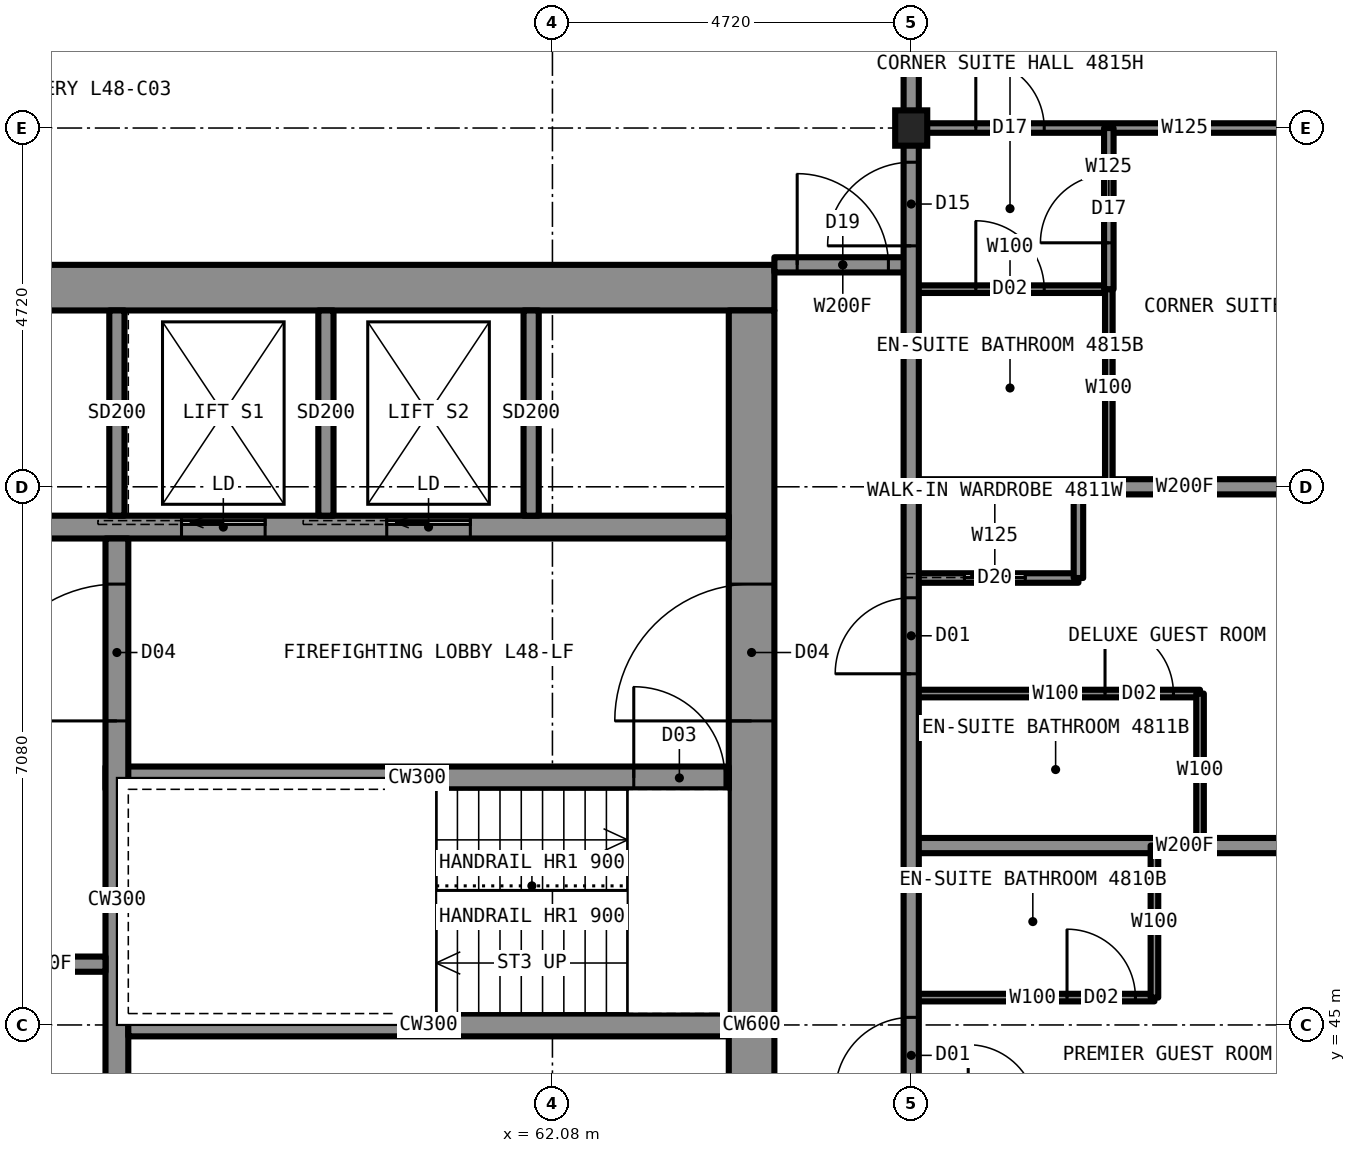
"""IFC4 building model, lengths in metres.
Left out: names, types, materials, properties, quantities, classifications, styles, units other than length and angle.
Written with IfcOpenShell. Run it as: python <this file> out.ifc"""

import sys

from ifc_helpers import new_model, si_unit, direction, frame, frame_2d, origin, origin_2d, place, context, subcontext, project, spatial, rectangle, i_section, extrude, element, fill, save


model = new_model("IFC4")
c1 = context("Model", 3, precision=1e-05, world=origin(), true_north=direction((0.0, 1.0)))
c2 = subcontext(c1, "Body", "Model", "MODEL_VIEW")
j1 = project(units=[si_unit("LENGTHUNIT", "METRE"), si_unit("PLANEANGLEUNIT", "RADIAN")], contexts=[c1])
p1 = place(None, origin())
s1 = spatial("IfcSite", under=j1, at=p1, CompositionType="ELEMENT")
p2 = place(p1, origin())
s2 = spatial("IfcBuilding", under=s1, at=p2, CompositionType="ELEMENT")
p3 = place(p2, frame((0.0, 0.0, 172.3)))
s3 = spatial("IfcBuildingStorey", under=s2, at=p3, CompositionType="ELEMENT", Elevation=172.3)
p4 = place(p3, frame((66.8, 56.8, 0.0), z_axis=(0.0, 0.0, 1.0), x_axis=(1.0, 0.0, 0.0)))
e1 = element("IfcColumn", 1, at=p4, inside=s3, PredefinedType="COLUMN", context=c2, shape_type="SweptSolid", body=[
    extrude(i_section(OverallWidth=0.422, OverallDepth=0.465, WebThickness=0.045, FlangeThickness=0.073, at=origin_2d()), origin(), (0.0, 0.0, 1.0), 3.5),
])
p5 = place(p3, frame((45.0, 54.7, 0.0), z_axis=(0.0, 0.0, 1.0), x_axis=(1.0, 0.0, 0.0)))
e2 = element("IfcWall", 2, at=p5, inside=s3, PredefinedType="SHEAR", context=c2, shape_type="SweptSolid", body=[
    extrude(rectangle(XDim=20.0, YDim=0.6, at=frame_2d((10.0, 0.0))), origin(), (0.0, 0.0, 1.0), 3.5),
])
p6 = place(p3, frame((64.7, 35.6, 0.0), z_axis=(0.0, 0.0, 1.0), x_axis=(0.0, 1.0, 0.0)))
e3 = element("IfcWall", 3, at=p6, inside=s3, PredefinedType="SHEAR", context=c2, shape_type="SweptSolid", body=[
    extrude(rectangle(XDim=18.8, YDim=0.6, at=frame_2d((9.4, 0.0))), origin(), (0.0, 0.0, 1.0), 3.5),
])
p7 = place(p6, frame((13.4, 0.0, 0.0)))
e4 = element("IfcOpeningElement", 4, at=p7, cuts=e3, PredefinedType="OPENING", context=c2, shape_type="SweptSolid", body=[
    extrude(rectangle(XDim=1.8, YDim=2.2, at=frame_2d((0.9, 1.1))), frame((0.0, 0.31, 0.0), z_axis=(0.0, -1.0, 0.0), x_axis=(1.0, 0.0, 0.0)), (0.0, 0.0, 1.0), 0.62),
])
p8 = place(p6, frame((3.6, 0.0, 0.0)))
e5 = element("IfcOpeningElement", 5, at=p8, cuts=e3, PredefinedType="OPENING", context=c2, shape_type="SweptSolid", body=[
    extrude(rectangle(XDim=1.8, YDim=2.2, at=frame_2d((0.9, 1.1))), frame((0.0, 0.31, 0.0), z_axis=(0.0, -1.0, 0.0), x_axis=(1.0, 0.0, 0.0)), (0.0, 0.0, 1.0), 0.62),
])
p9 = place(p3, frame((45.6, 51.55, 0.0), z_axis=(0.0, 0.0, 1.0), x_axis=(1.0, 0.0, 0.0)))
e6 = element("IfcWall", 6, at=p9, inside=s3, PredefinedType="SHEAR", context=c2, shape_type="SweptSolid", body=[
    extrude(rectangle(XDim=18.8, YDim=0.3, at=frame_2d((9.4, 0.0))), origin(), (0.0, 0.0, 1.0), 3.5),
])
p10 = place(p9, frame((4.8, 0.0, 0.0)))
e7 = element("IfcOpeningElement", 7, at=p10, cuts=e6, PredefinedType="OPENING", context=c2, shape_type="SweptSolid", body=[
    extrude(rectangle(XDim=1.0, YDim=2.1, at=frame_2d((0.5, 1.05))), frame((0.0, 0.16, 0.0), z_axis=(0.0, -1.0, 0.0), x_axis=(1.0, 0.0, 0.0)), (0.0, 0.0, 1.0), 0.32),
])
p11 = place(p9, frame((11.6, 0.0, 0.0)))
e8 = element("IfcOpeningElement", 8, at=p11, cuts=e6, PredefinedType="OPENING", context=c2, shape_type="SweptSolid", body=[
    extrude(rectangle(XDim=1.1, YDim=2.2, at=frame_2d((0.55, 1.1))), frame((0.0, 0.16, 0.0), z_axis=(0.0, -1.0, 0.0), x_axis=(1.0, 0.0, 0.0)), (0.0, 0.0, 1.0), 0.32),
])
p12 = place(p9, frame((14.3, 0.0, 0.0)))
e9 = element("IfcOpeningElement", 9, at=p12, cuts=e6, PredefinedType="OPENING", context=c2, shape_type="SweptSolid", body=[
    extrude(rectangle(XDim=1.1, YDim=2.2, at=frame_2d((0.55, 1.1))), frame((0.0, 0.16, 0.0), z_axis=(0.0, -1.0, 0.0), x_axis=(1.0, 0.0, 0.0)), (0.0, 0.0, 1.0), 0.32),
])
p13 = place(p3, frame((56.2, 48.25, 0.0), z_axis=(0.0, 0.0, 1.0), x_axis=(1.0, 0.0, 0.0)))
e10 = element("IfcWall", 10, at=p13, inside=s3, PredefinedType="SHEAR", context=c2, shape_type="SweptSolid", body=[
    extrude(rectangle(XDim=8.2, YDim=0.3, at=frame_2d((4.1, 0.0))), origin(), (0.0, 0.0, 1.0), 3.5),
])
p14 = place(p13, frame((6.95, 0.0, 0.0)))
e11 = element("IfcOpeningElement", 11, at=p14, cuts=e10, PredefinedType="OPENING", context=c2, shape_type="SweptSolid", body=[
    extrude(rectangle(XDim=1.2, YDim=2.2, at=frame_2d((0.6, 1.1))), frame((0.0, 0.16, 0.0), z_axis=(0.0, -1.0, 0.0), x_axis=(1.0, 0.0, 0.0)), (0.0, 0.0, 1.0), 0.32),
])
p15 = place(p3, frame((56.35, 41.9, 0.0), z_axis=(0.0, 0.0, 1.0), x_axis=(0.0, 1.0, 0.0)))
e12 = element("IfcWall", 12, at=p15, inside=s3, PredefinedType="SHEAR", context=c2, shape_type="SweptSolid", body=[
    extrude(rectangle(XDim=9.5, YDim=0.3, at=frame_2d((4.75, 0.0))), origin(), (0.0, 0.0, 1.0), 3.5),
])
p16 = place(p15, frame((7.1, 0.0, 0.0)))
e13 = element("IfcOpeningElement", 13, at=p16, cuts=e12, PredefinedType="OPENING", context=c2, shape_type="SweptSolid", body=[
    extrude(rectangle(XDim=1.8, YDim=2.2, at=frame_2d((0.9, 1.1))), frame((0.0, 0.16, 0.0), z_axis=(0.0, -1.0, 0.0), x_axis=(1.0, 0.0, 0.0)), (0.0, 0.0, 1.0), 0.32),
])
p17 = place(p3, frame((56.5, 45.0, 0.0), z_axis=(0.0, 0.0, 1.0), x_axis=(1.0, 0.0, 0.0)))
e14 = element("IfcWall", 14, at=p17, inside=s3, PredefinedType="SHEAR", context=c2, shape_type="SweptSolid", body=[
    extrude(rectangle(XDim=7.9, YDim=0.3, at=frame_2d((3.95, 0.0))), origin(), (0.0, 0.0, 1.0), 3.5),
])
p18 = place(p3, frame((66.8, 45.36, 0.0), z_axis=(0.0, 0.0, 1.0), x_axis=(1.0, 0.0, 0.0)))
e15 = element("IfcWall", 15, at=p18, inside=s3, PredefinedType="PARTITIONING", context=c2, shape_type="SweptSolid", body=[
    extrude(rectangle(XDim=3.2, YDim=0.1, at=frame_2d((1.6, 0.0))), origin(), (0.0, 0.0, 1.0), 3.33),
])
p19 = place(p18, frame((2.05, 0.0, 0.0)))
e16 = element("IfcOpeningElement", 16, at=p19, cuts=e15, PredefinedType="OPENING", context=c2, shape_type="SweptSolid", body=[
    extrude(rectangle(XDim=0.9, YDim=2.1, at=frame_2d((0.45, 1.05))), frame((0.0, 0.06, 0.0), z_axis=(0.0, -1.0, 0.0), x_axis=(1.0, 0.0, 0.0)), (0.0, 0.0, 1.0), 0.12),
])
p20 = place(p3, frame((65.0, 55.0, 0.0), z_axis=(0.0, 0.0, 1.0), x_axis=(1.0, 0.0, 0.0)))
e17 = element("IfcWall", 17, at=p20, inside=s3, PredefinedType="PARTITIONING", context=c2, shape_type="SweptSolid", body=[
    extrude(rectangle(XDim=1.8, YDim=0.2, at=frame_2d((0.9, 0.0))), origin(), (0.0, 0.0, 1.0), 3.33),
])
p21 = place(p20, frame((0.3, 0.0, 0.0)))
e18 = element("IfcOpeningElement", 18, at=p21, cuts=e17, PredefinedType="OPENING", context=c2, shape_type="SweptSolid", body=[
    extrude(rectangle(XDim=1.2, YDim=2.2, at=frame_2d((0.6, 1.1))), frame((0.0, 0.11, 0.0), z_axis=(0.0, -1.0, 0.0), x_axis=(1.0, 0.0, 0.0)), (0.0, 0.0, 1.0), 0.22),
])
p22 = place(p3, frame((66.8, 56.8, 0.0), z_axis=(0.0, 0.0, 1.0), x_axis=(1.0, 0.0, 0.0)))
e19 = element("IfcWall", 19, at=p22, inside=s3, PredefinedType="PARTITIONING", context=c2, shape_type="SweptSolid", body=[
    extrude(rectangle(XDim=7.2, YDim=0.125, at=frame_2d((3.6, 0.0))), origin(), (0.0, 0.0, 1.0), 2.573),
])
p23 = place(p22, frame((0.85, 0.0, 0.0)))
e20 = element("IfcOpeningElement", 20, at=p23, cuts=e19, PredefinedType="OPENING", context=c2, shape_type="SweptSolid", body=[
    extrude(rectangle(XDim=0.9, YDim=2.2, at=frame_2d((0.45, 1.1))), frame((0.0, 0.073, 0.0), z_axis=(0.0, -1.0, 0.0), x_axis=(1.0, 0.0, 0.0)), (0.0, 0.0, 1.0), 0.145),
])
p24 = place(p3, frame((66.8, 47.36, 0.0), z_axis=(0.0, 0.0, 1.0), x_axis=(1.0, 0.0, 0.0)))
e21 = element("IfcWall", 21, at=p24, inside=s3, PredefinedType="PARTITIONING", context=c2, shape_type="SweptSolid", body=[
    extrude(rectangle(XDim=7.2, YDim=0.2, at=frame_2d((3.6, 0.0))), origin(), (0.0, 0.0, 1.0), 2.73),
])
p25 = place(p3, frame((66.8, 49.36, 0.0), z_axis=(0.0, 0.0, 1.0), x_axis=(1.0, 0.0, 0.0)))
e22 = element("IfcWall", 22, at=p25, inside=s3, PredefinedType="PARTITIONING", context=c2, shape_type="SweptSolid", body=[
    extrude(rectangle(XDim=3.8, YDim=0.1, at=frame_2d((1.9, 0.0))), origin(), (0.0, 0.0, 1.0), 3.33),
])
p26 = place(p25, frame((2.55, 0.0, 0.0)))
e23 = element("IfcOpeningElement", 23, at=p26, cuts=e22, PredefinedType="OPENING", context=c2, shape_type="SweptSolid", body=[
    extrude(rectangle(XDim=0.9, YDim=2.1, at=frame_2d((0.45, 1.05))), frame((0.0, 0.06, 0.0), z_axis=(0.0, -1.0, 0.0), x_axis=(1.0, 0.0, 0.0)), (0.0, 0.0, 1.0), 0.12),
])
p27 = place(p3, frame((66.8, 50.88, 0.0), z_axis=(0.0, 0.0, 1.0), x_axis=(1.0, 0.0, 0.0)))
e24 = element("IfcWall", 24, at=p27, inside=s3, PredefinedType="PARTITIONING", context=c2, shape_type="SweptSolid", body=[
    extrude(rectangle(XDim=2.2, YDim=0.125, at=frame_2d((1.1, 0.0))), origin(), (0.0, 0.0, 1.0), 3.33),
])
p28 = place(p27, frame((0.7, 0.0, 0.0)))
e25 = element("IfcOpeningElement", 25, at=p28, cuts=e24, PredefinedType="OPENING", context=c2, shape_type="SweptSolid", body=[
    extrude(rectangle(XDim=0.8, YDim=2.1, at=frame_2d((0.4, 1.05))), frame((0.0, 0.073, 0.0), z_axis=(0.0, -1.0, 0.0), x_axis=(1.0, 0.0, 0.0)), (0.0, 0.0, 1.0), 0.145),
])
p29 = place(p3, frame((66.8, 52.08, 0.0), z_axis=(0.0, 0.0, 1.0), x_axis=(1.0, 0.0, 0.0)))
e26 = element("IfcWall", 26, at=p29, inside=s3, PredefinedType="PARTITIONING", context=c2, shape_type="SweptSolid", body=[
    extrude(rectangle(XDim=7.2, YDim=0.2, at=frame_2d((3.6, 0.0))), origin(), (0.0, 0.0, 1.0), 2.573),
])
p30 = place(p3, frame((66.8, 54.68, 0.0), z_axis=(0.0, 0.0, 1.0), x_axis=(1.0, 0.0, 0.0)))
e27 = element("IfcWall", 27, at=p30, inside=s3, PredefinedType="PARTITIONING", context=c2, shape_type="SweptSolid", body=[
    extrude(rectangle(XDim=2.6, YDim=0.1, at=frame_2d((1.3, 0.0))), origin(), (0.0, 0.0, 1.0), 3.33),
])
p31 = place(p30, frame((0.85, 0.0, 0.0)))
e28 = element("IfcOpeningElement", 28, at=p31, cuts=e27, PredefinedType="OPENING", context=c2, shape_type="SweptSolid", body=[
    extrude(rectangle(XDim=0.9, YDim=2.1, at=frame_2d((0.45, 1.05))), frame((0.0, 0.06, 0.0), z_axis=(0.0, -1.0, 0.0), x_axis=(1.0, 0.0, 0.0)), (0.0, 0.0, 1.0), 0.12),
])
p32 = place(p3, frame((66.8, 33.2, 0.0), z_axis=(0.0, 0.0, 1.0), x_axis=(0.0, 1.0, 0.0)))
e29 = element("IfcWall", 29, at=p32, inside=s3, PredefinedType="PARTITIONING", context=c2, shape_type="SweptSolid", body=[
    extrude(rectangle(XDim=23.58, YDim=0.2, at=frame_2d((11.79, 0.0))), origin(), (0.0, 0.0, 1.0), 3.33),
])
p33 = place(p32, frame((7.87, 0.0, 0.0)))
e30 = element("IfcOpeningElement", 30, at=p33, cuts=e29, PredefinedType="OPENING", context=c2, shape_type="SweptSolid", body=[
    extrude(rectangle(XDim=1.0, YDim=2.2, at=frame_2d((0.5, 1.1))), frame((0.0, 0.11, 0.0), z_axis=(0.0, -1.0, 0.0), x_axis=(1.0, 0.0, 0.0)), (0.0, 0.0, 1.0), 0.22),
])
p34 = place(p32, frame((10.9, 0.0, 0.0)))
e31 = element("IfcOpeningElement", 31, at=p34, cuts=e29, PredefinedType="OPENING", context=c2, shape_type="SweptSolid", body=[
    extrude(rectangle(XDim=1.0, YDim=2.2, at=frame_2d((0.5, 1.1))), frame((0.0, 0.11, 0.0), z_axis=(0.0, -1.0, 0.0), x_axis=(1.0, 0.0, 0.0)), (0.0, 0.0, 1.0), 0.22),
])
p35 = place(p32, frame((16.42, 0.0, 0.0)))
e32 = element("IfcOpeningElement", 32, at=p35, cuts=e29, PredefinedType="OPENING", context=c2, shape_type="SweptSolid", body=[
    extrude(rectangle(XDim=1.0, YDim=2.2, at=frame_2d((0.5, 1.1))), frame((0.0, 0.11, 0.0), z_axis=(0.0, -1.0, 0.0), x_axis=(1.0, 0.0, 0.0)), (0.0, 0.0, 1.0), 0.22),
])
p36 = place(p32, frame((22.05, 0.0, 0.0)))
e33 = element("IfcOpeningElement", 33, at=p36, cuts=e29, PredefinedType="OPENING", context=c2, shape_type="SweptSolid", body=[
    extrude(rectangle(XDim=1.1, YDim=2.2, at=frame_2d((0.55, 1.1))), frame((0.0, 0.11, 0.0), z_axis=(0.0, -1.0, 0.0), x_axis=(1.0, 0.0, 0.0)), (0.0, 0.0, 1.0), 0.22),
])
p37 = place(p32, frame((0.65, 0.0, 0.0)))
e34 = element("IfcOpeningElement", 34, at=p37, cuts=e29, PredefinedType="OPENING", context=c2, shape_type="SweptSolid", body=[
    extrude(rectangle(XDim=1.1, YDim=2.2, at=frame_2d((0.55, 1.1))), frame((0.0, 0.11, 0.0), z_axis=(0.0, -1.0, 0.0), x_axis=(1.0, 0.0, 0.0)), (0.0, 0.0, 1.0), 0.22),
])
p38 = place(p3, frame((69.0, 50.88, 0.0), z_axis=(0.0, 0.0, 1.0), x_axis=(0.0, 1.0, 0.0)))
e35 = element("IfcWall", 35, at=p38, inside=s3, PredefinedType="PARTITIONING", context=c2, shape_type="SweptSolid", body=[
    extrude(rectangle(XDim=1.2, YDim=0.125, at=frame_2d((0.6, 0.0))), origin(), (0.0, 0.0, 1.0), 3.33),
])
p39 = place(p3, frame((69.4, 52.08, 0.0), z_axis=(0.0, 0.0, 1.0), x_axis=(0.0, 1.0, 0.0)))
e36 = element("IfcWall", 36, at=p39, inside=s3, PredefinedType="PARTITIONING", context=c2, shape_type="SweptSolid", body=[
    extrude(rectangle(XDim=2.6, YDim=0.1, at=frame_2d((1.3, 0.0))), origin(), (0.0, 0.0, 1.0), 3.33),
])
p40 = place(p3, frame((69.4, 54.68, 0.0), z_axis=(0.0, 0.0, 1.0), x_axis=(0.0, 1.0, 0.0)))
e37 = element("IfcWall", 37, at=p40, inside=s3, PredefinedType="PARTITIONING", context=c2, shape_type="SweptSolid", body=[
    extrude(rectangle(XDim=2.12, YDim=0.125, at=frame_2d((1.06, 0.0))), origin(), (0.0, 0.0, 1.0), 3.33),
])
p41 = place(p40, frame((0.61, 0.0, 0.0)))
e38 = element("IfcOpeningElement", 38, at=p41, cuts=e37, PredefinedType="OPENING", context=c2, shape_type="SweptSolid", body=[
    extrude(rectangle(XDim=0.9, YDim=2.2, at=frame_2d((0.45, 1.1))), frame((0.0, 0.073, 0.0), z_axis=(0.0, -1.0, 0.0), x_axis=(1.0, 0.0, 0.0)), (0.0, 0.0, 1.0), 0.145),
])
for number, where, z_axis, x_axis in (
    (39, (70.0, 45.36, 0.0), (0.0, 0.0, 1.0), (0.0, 1.0, 0.0)),
    (40, (70.6, 47.36, 0.0), (0.0, 0.0, 1.0), (0.0, 1.0, 0.0)),
):
    element("IfcWall", number, at=place(p3, frame(where, z_axis=z_axis, x_axis=x_axis)), inside=s3, PredefinedType="PARTITIONING", context=c2, shape_type="SweptSolid", body=[
        extrude(rectangle(XDim=2.0, YDim=0.1, at=frame_2d((1.0, 0.0))), origin(), (0.0, 0.0, 1.0), 3.33),
    ])
for number, where, z_axis, x_axis in (
    (41, (59.1, 51.7, 0.0), (0.0, 0.0, 1.0), (0.0, 1.0, 0.0)),
    (42, (61.8, 51.7, 0.0), (0.0, 0.0, 1.0), (0.0, 1.0, 0.0)),
    (43, (56.35, 51.7, 0.0), (0.0, 0.0, 1.0), (0.0, 1.0, 0.0)),
):
    element("IfcWall", number, at=place(p3, frame(where, z_axis=z_axis, x_axis=x_axis)), inside=s3, PredefinedType="PARTITIONING", context=c2, shape_type="SweptSolid", body=[
        extrude(rectangle(XDim=2.7, YDim=0.2, at=frame_2d((1.35, 0.0))), origin(), (0.0, 0.0, 1.0), 3.33),
    ])
p42 = place(p3, frame((66.8, 56.78, 0.0), z_axis=(0.0, 0.0, 1.0), x_axis=(0.0, 1.0, 0.0)))
e44 = element("IfcWall", 44, at=p42, inside=s3, PredefinedType="PARTITIONING", context=c2, shape_type="SweptSolid", body=[
    extrude(rectangle(XDim=2.82, YDim=0.2, at=frame_2d((1.41, 0.0))), origin(), (0.0, 0.0, 1.0), 2.573),
])
p43 = place(p21, origin())
e45 = element("IfcDoor", 45, at=p43, inside=s3, OperationType="SINGLE_SWING_LEFT", PredefinedType="DOOR", context=c2, shape_type="SweptSolid", body=[
    extrude(rectangle(XDim=1.2, YDim=2.2, at=frame_2d((0.6, 1.1))), frame((0.0, 0.025, 0.0), z_axis=(0.0, -1.0, 0.0), x_axis=(1.0, 0.0, 0.0)), (0.0, 0.0, 1.0), 0.05),
])
fill(e18, e45)
p44 = place(p34, origin())
e46 = element("IfcDoor", 46, at=p44, inside=s3, OperationType="SINGLE_SWING_LEFT", PredefinedType="DOOR", context=c2, shape_type="SweptSolid", body=[
    extrude(rectangle(XDim=1.0, YDim=2.2, at=frame_2d((0.5, 1.1))), frame((0.0, 0.025, 0.0), z_axis=(0.0, -1.0, 0.0), x_axis=(1.0, 0.0, 0.0)), (0.0, 0.0, 1.0), 0.05),
])
fill(e31, e46)
p45 = place(p19, origin())
e47 = element("IfcDoor", 47, at=p45, inside=s3, OperationType="SINGLE_SWING_RIGHT", PredefinedType="DOOR", context=c2, shape_type="SweptSolid", body=[
    extrude(rectangle(XDim=0.9, YDim=2.1, at=frame_2d((0.45, 1.05))), frame((0.0, 0.025, 0.0), z_axis=(0.0, -1.0, 0.0), x_axis=(1.0, 0.0, 0.0)), (0.0, 0.0, 1.0), 0.05),
])
fill(e16, e47)
p46 = place(p35, origin())
e48 = element("IfcDoor", 48, at=p46, inside=s3, OperationType="SINGLE_SWING_LEFT", PredefinedType="DOOR", context=c2, shape_type="SweptSolid", body=[
    extrude(rectangle(XDim=1.0, YDim=2.2, at=frame_2d((0.5, 1.1))), frame((0.0, 0.025, 0.0), z_axis=(0.0, -1.0, 0.0), x_axis=(1.0, 0.0, 0.0)), (0.0, 0.0, 1.0), 0.05),
])
fill(e32, e48)
p47 = place(p26, origin())
e49 = element("IfcDoor", 49, at=p47, inside=s3, OperationType="SINGLE_SWING_RIGHT", PredefinedType="DOOR", context=c2, shape_type="SweptSolid", body=[
    extrude(rectangle(XDim=0.9, YDim=2.1, at=frame_2d((0.45, 1.05))), frame((0.0, 0.025, 0.0), z_axis=(0.0, -1.0, 0.0), x_axis=(1.0, 0.0, 0.0)), (0.0, 0.0, 1.0), 0.05),
])
fill(e23, e49)
p48 = place(p28, origin())
e50 = element("IfcDoor", 50, at=p48, inside=s3, OperationType="SLIDING_TO_LEFT", PredefinedType="DOOR", context=c2, shape_type="SweptSolid", body=[
    extrude(rectangle(XDim=0.8, YDim=2.1, at=frame_2d((0.4, 1.05))), frame((0.0, 0.025, 0.0), z_axis=(0.0, -1.0, 0.0), x_axis=(1.0, 0.0, 0.0)), (0.0, 0.0, 1.0), 0.05),
])
fill(e25, e50)
p49 = place(p23, origin())
e51 = element("IfcDoor", 51, at=p49, inside=s3, OperationType="SINGLE_SWING_LEFT", PredefinedType="DOOR", context=c2, shape_type="SweptSolid", body=[
    extrude(rectangle(XDim=0.9, YDim=2.2, at=frame_2d((0.45, 1.1))), frame((0.0, 0.025, 0.0), z_axis=(0.0, -1.0, 0.0), x_axis=(1.0, 0.0, 0.0)), (0.0, 0.0, 1.0), 0.05),
])
fill(e20, e51)
p50 = place(p31, origin())
e52 = element("IfcDoor", 52, at=p50, inside=s3, OperationType="SINGLE_SWING_RIGHT", PredefinedType="DOOR", context=c2, shape_type="SweptSolid", body=[
    extrude(rectangle(XDim=0.9, YDim=2.1, at=frame_2d((0.45, 1.05))), frame((0.0, 0.025, 0.0), z_axis=(0.0, -1.0, 0.0), x_axis=(1.0, 0.0, 0.0)), (0.0, 0.0, 1.0), 0.05),
])
fill(e28, e52)
p51 = place(p36, origin())
e53 = element("IfcDoor", 53, at=p51, inside=s3, OperationType="SINGLE_SWING_LEFT", PredefinedType="DOOR", context=c2, shape_type="SweptSolid", body=[
    extrude(rectangle(XDim=1.1, YDim=2.2, at=frame_2d((0.55, 1.1))), frame((0.0, 0.025, 0.0), z_axis=(0.0, -1.0, 0.0), x_axis=(1.0, 0.0, 0.0)), (0.0, 0.0, 1.0), 0.05),
])
fill(e33, e53)
p52 = place(p41, origin())
e54 = element("IfcDoor", 54, at=p52, inside=s3, OperationType="SINGLE_SWING_LEFT", PredefinedType="DOOR", context=c2, shape_type="SweptSolid", body=[
    extrude(rectangle(XDim=0.9, YDim=2.2, at=frame_2d((0.45, 1.1))), frame((0.0, 0.025, 0.0), z_axis=(0.0, -1.0, 0.0), x_axis=(1.0, 0.0, 0.0)), (0.0, 0.0, 1.0), 0.05),
])
fill(e38, e54)
p53 = place(p7, origin())
e55 = element("IfcDoor", 55, at=p53, inside=s3, OperationType="DOUBLE_DOOR_SINGLE_SWING", PredefinedType="DOOR", context=c2, shape_type="SweptSolid", body=[
    extrude(rectangle(XDim=1.8, YDim=2.2, at=frame_2d((0.9, 1.1))), frame((0.0, 0.025, 0.0), z_axis=(0.0, -1.0, 0.0), x_axis=(1.0, 0.0, 0.0)), (0.0, 0.0, 1.0), 0.05),
])
fill(e4, e55)
p54 = place(p16, origin())
e56 = element("IfcDoor", 56, at=p54, inside=s3, OperationType="DOUBLE_DOOR_SINGLE_SWING", PredefinedType="DOOR", context=c2, shape_type="SweptSolid", body=[
    extrude(rectangle(XDim=1.8, YDim=2.2, at=frame_2d((0.9, 1.1))), frame((0.0, 0.025, 0.0), z_axis=(0.0, -1.0, 0.0), x_axis=(1.0, 0.0, 0.0)), (0.0, 0.0, 1.0), 0.05),
])
fill(e13, e56)
p55 = place(p14, origin())
e57 = element("IfcDoor", 57, at=p55, inside=s3, OperationType="SINGLE_SWING_LEFT", PredefinedType="DOOR", context=c2, shape_type="SweptSolid", body=[
    extrude(rectangle(XDim=1.2, YDim=2.2, at=frame_2d((0.6, 1.1))), frame((0.0, 0.025, 0.0), z_axis=(0.0, -1.0, 0.0), x_axis=(1.0, 0.0, 0.0)), (0.0, 0.0, 1.0), 0.05),
])
fill(e11, e57)
p56 = place(p11, origin())
e58 = element("IfcDoor", 58, at=p56, inside=s3, OperationType="SLIDING_TO_LEFT", PredefinedType="DOOR", context=c2, shape_type="SweptSolid", body=[
    extrude(rectangle(XDim=1.1, YDim=2.2, at=frame_2d((0.55, 1.1))), frame((0.0, 0.025, 0.0), z_axis=(0.0, -1.0, 0.0), x_axis=(1.0, 0.0, 0.0)), (0.0, 0.0, 1.0), 0.05),
])
fill(e8, e58)
p57 = place(p12, origin())
e59 = element("IfcDoor", 59, at=p57, inside=s3, OperationType="SLIDING_TO_LEFT", PredefinedType="DOOR", context=c2, shape_type="SweptSolid", body=[
    extrude(rectangle(XDim=1.1, YDim=2.2, at=frame_2d((0.55, 1.1))), frame((0.0, 0.025, 0.0), z_axis=(0.0, -1.0, 0.0), x_axis=(1.0, 0.0, 0.0)), (0.0, 0.0, 1.0), 0.05),
])
fill(e9, e59)
save(model, sys.argv[1])
